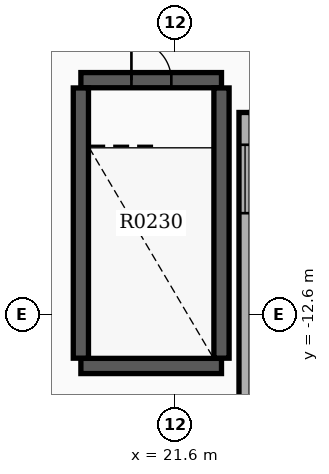
"""IFC4 building model, lengths in metres.
Left out: names, types, materials, properties, quantities, classifications, styles, units other than length and angle.
Written with IfcOpenShell. Run it as: python <this file> out.ifc"""

import sys

from ifc_helpers import new_model, si_unit, direction, frame, frame_2d, origin, place, context, subcontext, project, spatial, rectangle, extrude, element, fill, save


model = new_model("IFC4")
c1 = context("Model", 3, precision=1e-05, world=origin(), true_north=direction((0.0, 1.0)))
c2 = subcontext(c1, "Body", "Model", "MODEL_VIEW")
j1 = project(units=[si_unit("LENGTHUNIT", "METRE"), si_unit("PLANEANGLEUNIT", "RADIAN")], contexts=[c1])
p1 = place(None, origin())
s1 = spatial("IfcSite", under=j1, at=p1, CompositionType="ELEMENT")
p2 = place(p1, origin())
s2 = spatial("IfcBuilding", under=s1, at=p2, CompositionType="ELEMENT")
p3 = place(p2, frame((0.0, 0.0, 19.2)))
s3 = spatial("IfcBuildingStorey", under=s2, at=p3, CompositionType="ELEMENT", Elevation=19.2)
p4 = place(p3, frame((19.12, -6.43, 0.0), z_axis=(0.0, 0.0, 1.0), x_axis=(1.0, 0.0, 0.0)))
e1 = element("IfcWall", 1, at=p4, inside=s3, PredefinedType="SHEAR", context=c2, shape_type="SweptSolid", body=[
    extrude(rectangle(XDim=3.7, YDim=0.4, at=frame_2d((1.85, 0.0))), origin(), (0.0, 0.0, 1.0), 4.3),
])
p5 = place(p4, frame((1.33, 0.0, 0.0)))
e2 = element("IfcOpeningElement", 2, at=p5, cuts=e1, PredefinedType="OPENING", context=c2, shape_type="SweptSolid", body=[
    extrude(rectangle(XDim=1.05, YDim=2.15, at=frame_2d((0.525, 1.075))), frame((0.0, 0.21, 0.0), z_axis=(0.0, -1.0, 0.0), x_axis=(1.0, 0.0, 0.0)), (0.0, 0.0, 1.0), 0.42),
])
p6 = place(p3, frame((19.12, -13.95, 0.0), z_axis=(0.0, 0.0, 1.0), x_axis=(1.0, 0.0, 0.0)))
e3 = element("IfcWall", 3, at=p6, inside=s3, PredefinedType="SHEAR", context=c2, shape_type="SweptSolid", body=[
    extrude(rectangle(XDim=3.7, YDim=0.4, at=frame_2d((1.85, 0.0))), origin(), (0.0, 0.0, 1.0), 4.3),
])
for number, where, z_axis, x_axis in (
    (4, (19.12, -13.745, 0.0), (0.0, 0.0, 1.0), (0.0, 1.0, 0.0)),
    (5, (22.82, -13.745, 0.0), (0.0, 0.0, 1.0), (0.0, 1.0, 0.0)),
):
    element("IfcWall", number, at=place(p3, frame(where, z_axis=z_axis, x_axis=x_axis)), inside=s3, PredefinedType="SHEAR", context=c2, shape_type="SweptSolid", body=[
        extrude(rectangle(XDim=7.11, YDim=0.4, at=frame_2d((3.555, 0.0))), origin(), (0.0, 0.0, 1.0), 4.3),
    ])
p7 = place(p3, frame((23.44, -7.28, 0.0), z_axis=(0.0, 0.0, 1.0), x_axis=(0.0, -1.0, 0.0)))
e6 = element("IfcWall", 6, at=p7, inside=s3, PredefinedType="STANDARD", context=c2, shape_type="SweptSolid", body=[
    extrude(rectangle(XDim=13.12, YDim=0.32, at=frame_2d((6.56, 0.0))), origin(), (0.0, 0.0, 1.0), 3.38),
])
p8 = place(p7, frame((0.85, 0.0, 0.65)))
e7 = element("IfcOpeningElement", 7, at=p8, cuts=e6, PredefinedType="OPENING", context=c2, shape_type="SweptSolid", body=[
    extrude(rectangle(XDim=1.8, YDim=1.8, at=frame_2d((0.9, 0.9))), frame((0.0, 0.17, 0.0), z_axis=(0.0, -1.0, 0.0), x_axis=(1.0, 0.0, 0.0)), (0.0, 0.0, 1.0), 0.34),
])
p9 = place(p7, frame((8.55, 0.0, 0.0)))
e8 = element("IfcOpeningElement", 8, at=p9, cuts=e6, PredefinedType="OPENING", context=c2, shape_type="SweptSolid", body=[
    extrude(rectangle(XDim=1.1, YDim=2.15, at=frame_2d((0.55, 1.075))), frame((0.0, 0.17, 0.0), z_axis=(0.0, -1.0, 0.0), x_axis=(1.0, 0.0, 0.0)), (0.0, 0.0, 1.0), 0.34),
])
p10 = place(p8, origin())
e9 = element("IfcWindow", 9, at=p10, inside=s3, PartitioningType="SINGLE_PANEL", PredefinedType="WINDOW", context=c2, shape_type="SweptSolid", body=[
    extrude(rectangle(XDim=1.8, YDim=1.8, at=frame_2d((0.9, 0.9))), frame((0.0, 0.03, 0.0), z_axis=(0.0, -1.0, 0.0), x_axis=(1.0, 0.0, 0.0)), (0.0, 0.0, 1.0), 0.06),
])
fill(e7, e9)
p11 = place(p5, origin())
e10 = element("IfcDoor", 10, at=p11, inside=s3, OperationType="SINGLE_SWING_LEFT", PredefinedType="DOOR", context=c2, shape_type="SweptSolid", body=[
    extrude(rectangle(XDim=1.05, YDim=2.15, at=frame_2d((0.525, 1.075))), frame((0.0, 0.025, 0.0), z_axis=(0.0, -1.0, 0.0), x_axis=(1.0, 0.0, 0.0)), (0.0, 0.0, 1.0), 0.05),
])
fill(e2, e10)
save(model, sys.argv[1])
